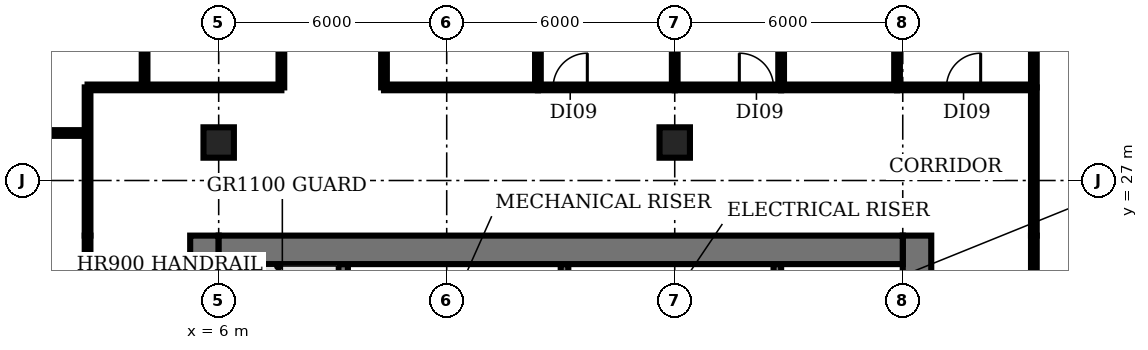
"""IFC4 building model, lengths in metres.
Left out: names, types, materials, properties, quantities, classifications, styles, units other than length and angle.
Written with IfcOpenShell. Run it as: python <this file> out.ifc"""

import sys

from ifc_helpers import new_model, si_unit, direction, frame, frame_2d, origin, origin_2d, place, context, subcontext, project, spatial, rectangle, extrude, element, fill, save


model = new_model("IFC4")
c1 = context("Model", 3, precision=1e-05, world=origin(), true_north=direction((0.0, 1.0)))
c2 = subcontext(c1, "Body", "Model", "MODEL_VIEW")
j1 = project(units=[si_unit("LENGTHUNIT", "METRE"), si_unit("PLANEANGLEUNIT", "RADIAN")], contexts=[c1])
p1 = place(None, origin())
s1 = spatial("IfcSite", under=j1, at=p1, CompositionType="ELEMENT")
p2 = place(p1, origin())
s2 = spatial("IfcBuilding", under=s1, at=p2, CompositionType="ELEMENT")
p3 = place(p2, frame((0.0, 0.0, 92.0)))
s3 = spatial("IfcBuildingStorey", under=s2, at=p3, CompositionType="ELEMENT", Elevation=92.0)
for number, where, z_axis, x_axis in (
    (1, (6.0, 28.0, 0.0), (0.0, 0.0, 1.0), (1.0, 0.0, 0.0)),
    (2, (18.0, 28.0, 0.0), (0.0, 0.0, 1.0), (1.0, 0.0, 0.0)),
):
    element("IfcColumn", number, at=place(p3, frame(where, z_axis=z_axis, x_axis=x_axis)), inside=s3, PredefinedType="COLUMN", context=c2, shape_type="SweptSolid", body=[
        extrude(rectangle(XDim=0.8, YDim=0.8, at=origin_2d()), origin(), (0.0, 0.0, 1.0), 3.85),
    ])
p4 = place(p3, frame((9.275, 18.375, 0.0), z_axis=(0.0, 0.0, 1.0), x_axis=(0.0, 1.0, 0.0)))
e3 = element("IfcWall", 3, at=p4, inside=s3, PredefinedType="SHEAR", context=c2, shape_type="SweptSolid", body=[
    extrude(rectangle(XDim=6.425, YDim=0.25, at=frame_2d((3.212, 0.0))), origin(), (0.0, 0.0, 1.0), 3.85),
])
for number, where, z_axis, x_axis in (
    (4, (15.1, 22.9, 0.0), (0.0, 0.0, 1.0), (0.0, 1.0, 0.0)),
    (5, (20.7, 22.9, 0.0), (0.0, 0.0, 1.0), (0.0, 1.0, 0.0)),
):
    element("IfcWall", number, at=place(p3, frame(where, z_axis=z_axis, x_axis=x_axis)), inside=s3, PredefinedType="SHEAR", context=c2, shape_type="SweptSolid", body=[
        extrude(rectangle(XDim=1.9, YDim=0.2, at=frame_2d((0.95, 0.0))), origin(), (0.0, 0.0, 1.0), 3.85),
    ])
p5 = place(p3, frame((5.625, 4.47, 0.0), z_axis=(0.0, 0.0, 1.0), x_axis=(0.0, 1.0, 0.0)))
e6 = element("IfcWall", 6, at=p5, inside=s3, PredefinedType="SHEAR", context=c2, shape_type="SweptSolid", body=[
    extrude(rectangle(XDim=21.08, YDim=0.75, at=frame_2d((10.54, 0.0))), origin(), (0.0, 0.0, 1.0), 3.85),
])
p6 = place(p5, frame((1.18, 0.0, 0.0)))
e7 = element("IfcOpeningElement", 7, at=p6, cuts=e6, PredefinedType="OPENING", context=c2, shape_type="SweptSolid", body=[
    extrude(rectangle(XDim=1.5, YDim=2.1, at=frame_2d((0.75, 1.05))), frame((0.0, 0.385, 0.0), z_axis=(0.0, -1.0, 0.0), x_axis=(1.0, 0.0, 0.0)), (0.0, 0.0, 1.0), 0.77),
])
p7 = place(p5, frame((7.63, 0.0, 0.0)))
e8 = element("IfcOpeningElement", 8, at=p7, cuts=e6, PredefinedType="OPENING", context=c2, shape_type="SweptSolid", body=[
    extrude(rectangle(XDim=1.2, YDim=2.1, at=frame_2d((0.6, 1.05))), frame((0.0, 0.385, 0.0), z_axis=(0.0, -1.0, 0.0), x_axis=(1.0, 0.0, 0.0)), (0.0, 0.0, 1.0), 0.77),
])
p8 = place(p5, frame((14.18, 0.0, 0.0)))
e9 = element("IfcOpeningElement", 9, at=p8, cuts=e6, PredefinedType="OPENING", context=c2, shape_type="SweptSolid", body=[
    extrude(rectangle(XDim=1.2, YDim=2.1, at=frame_2d((0.6, 1.05))), frame((0.0, 0.385, 0.0), z_axis=(0.0, -1.0, 0.0), x_axis=(1.0, 0.0, 0.0)), (0.0, 0.0, 1.0), 0.77),
])
p9 = place(p3, frame((24.375, 25.55, 0.0), z_axis=(0.0, 0.0, 1.0), x_axis=(0.0, -1.0, 0.0)))
e10 = element("IfcWall", 10, at=p9, inside=s3, PredefinedType="SHEAR", context=c2, shape_type="SweptSolid", body=[
    extrude(rectangle(XDim=21.13, YDim=0.75, at=frame_2d((10.565, 0.0))), origin(), (0.0, 0.0, 1.0), 3.85),
])
p10 = place(p9, frame((18.4, 0.0, 0.0)))
e11 = element("IfcOpeningElement", 11, at=p10, cuts=e10, PredefinedType="OPENING", context=c2, shape_type="SweptSolid", body=[
    extrude(rectangle(XDim=1.5, YDim=2.1, at=frame_2d((0.75, 1.05))), frame((0.0, 0.385, 0.0), z_axis=(0.0, -1.0, 0.0), x_axis=(1.0, 0.0, 0.0)), (0.0, 0.0, 1.0), 0.77),
])
p11 = place(p9, frame((12.3, 0.0, 0.0)))
e12 = element("IfcOpeningElement", 12, at=p11, cuts=e10, PredefinedType="OPENING", context=c2, shape_type="SweptSolid", body=[
    extrude(rectangle(XDim=0.9, YDim=2.1, at=frame_2d((0.45, 1.05))), frame((0.0, 0.385, 0.0), z_axis=(0.0, -1.0, 0.0), x_axis=(1.0, 0.0, 0.0)), (0.0, 0.0, 1.0), 0.77),
])
p12 = place(p9, frame((6.3, 0.0, 0.0)))
e13 = element("IfcOpeningElement", 13, at=p12, cuts=e10, PredefinedType="OPENING", context=c2, shape_type="SweptSolid", body=[
    extrude(rectangle(XDim=2.0, YDim=2.1, at=frame_2d((1.0, 1.05))), frame((0.0, 0.385, 0.0), z_axis=(0.0, -1.0, 0.0), x_axis=(1.0, 0.0, 0.0)), (0.0, 0.0, 1.0), 0.77),
])
p13 = place(p3, frame((6.0, 25.175, 0.0), z_axis=(0.0, 0.0, 1.0), x_axis=(1.0, 0.0, 0.0)))
e14 = element("IfcWall", 14, at=p13, inside=s3, PredefinedType="SHEAR", context=c2, shape_type="SweptSolid", body=[
    extrude(rectangle(XDim=18.0, YDim=0.75, at=frame_2d((9.0, 0.0))), origin(), (0.0, 0.0, 1.0), 3.85),
])
p14 = place(p3, frame((-0.98, 28.25, 0.0), z_axis=(0.0, 0.0, 1.0), x_axis=(1.0, 0.0, 0.0)))
e15 = element("IfcWall", 15, at=p14, inside=s3, PredefinedType="PARTITIONING", context=c2, shape_type="SweptSolid", body=[
    extrude(rectangle(XDim=3.53, YDim=0.15, at=frame_2d((1.765, 0.0))), origin(), (0.0, 0.0, 1.0), 2.83),
])
p15 = place(p3, frame((2.55, 6.078, 0.0), z_axis=(0.0, 0.0, 1.0), x_axis=(0.0, 1.0, 0.0)))
e16 = element("IfcWall", 16, at=p15, inside=s3, PredefinedType="PARTITIONING", context=c2, shape_type="SweptSolid", body=[
    extrude(rectangle(XDim=19.472, YDim=0.15, at=frame_2d((9.736, 0.0))), origin(), (0.0, 0.0, 1.0), 2.83),
])
p16 = place(p15, frame((7.572, 0.0, 0.0)))
e17 = element("IfcOpeningElement", 17, at=p16, cuts=e16, PredefinedType="OPENING", context=c2, shape_type="SweptSolid", body=[
    extrude(rectangle(XDim=1.2, YDim=2.1, at=frame_2d((0.6, 1.05))), frame((0.0, 0.085, 0.0), z_axis=(0.0, -1.0, 0.0), x_axis=(1.0, 0.0, 0.0)), (0.0, 0.0, 1.0), 0.17),
])
p17 = place(p3, frame((2.55, 25.55, 0.0), z_axis=(0.0, 0.0, 1.0), x_axis=(0.0, 1.0, 0.0)))
e18 = element("IfcWall", 18, at=p17, inside=s3, PredefinedType="PARTITIONING", context=c2, shape_type="SweptSolid", body=[
    extrude(rectangle(XDim=3.9, YDim=0.15, at=frame_2d((1.95, 0.0))), origin(), (0.0, 0.0, 1.0), 2.83),
])
p18 = place(p3, frame((2.55, 29.45, 0.0), z_axis=(0.0, 0.0, 1.0), x_axis=(1.0, 0.0, 0.0)))
e19 = element("IfcWall", 19, at=p18, inside=s3, PredefinedType="PARTITIONING", context=c2, shape_type="SweptSolid", body=[
    extrude(rectangle(XDim=5.1, YDim=0.15, at=frame_2d((2.55, 0.0))), origin(), (0.0, 0.0, 1.0), 2.83),
])
p19 = place(p3, frame((4.05, 29.45, 0.0), z_axis=(0.0, 0.0, 1.0), x_axis=(0.0, 1.0, 0.0)))
e20 = element("IfcWall", 20, at=p19, inside=s3, PredefinedType="PARTITIONING", context=c2, shape_type="SweptSolid", body=[
    extrude(rectangle(XDim=4.8, YDim=0.15, at=frame_2d((2.4, 0.0))), origin(), (0.0, 0.0, 1.0), 2.83),
])
p20 = place(p3, frame((7.65, 29.45, 0.0), z_axis=(0.0, 0.0, 1.0), x_axis=(0.0, 1.0, 0.0)))
e21 = element("IfcWall", 21, at=p20, inside=s3, PredefinedType="PARTITIONING", context=c2, shape_type="SweptSolid", body=[
    extrude(rectangle(XDim=4.8, YDim=0.15, at=frame_2d((2.4, 0.0))), origin(), (0.0, 0.0, 1.0), 2.83),
])
p21 = place(p20, frame((1.9, 0.0, 0.0)))
e22 = element("IfcOpeningElement", 22, at=p21, cuts=e21, PredefinedType="OPENING", context=c2, shape_type="SweptSolid", body=[
    extrude(rectangle(XDim=0.9, YDim=2.1, at=frame_2d((0.45, 1.05))), frame((0.0, 0.085, 0.0), z_axis=(0.0, -1.0, 0.0), x_axis=(1.0, 0.0, 0.0)), (0.0, 0.0, 1.0), 0.17),
])
p22 = place(p3, frame((10.35, 29.45, 0.0), z_axis=(0.0, 0.0, 1.0), x_axis=(0.0, 1.0, 0.0)))
e23 = element("IfcWall", 23, at=p22, inside=s3, PredefinedType="PARTITIONING", context=c2, shape_type="SweptSolid", body=[
    extrude(rectangle(XDim=4.8, YDim=0.15, at=frame_2d((2.4, 0.0))), origin(), (0.0, 0.0, 1.0), 2.83),
])
p23 = place(p3, frame((10.35, 29.45, 0.0), z_axis=(0.0, 0.0, 1.0), x_axis=(1.0, 0.0, 0.0)))
e24 = element("IfcWall", 24, at=p23, inside=s3, PredefinedType="PARTITIONING", context=c2, shape_type="SweptSolid", body=[
    extrude(rectangle(XDim=4.05, YDim=0.15, at=frame_2d((2.025, 0.0))), origin(), (0.0, 0.0, 1.0), 2.83),
])
p24 = place(p3, frame((14.4, 29.45, 0.0), z_axis=(0.0, 0.0, 1.0), x_axis=(0.0, 1.0, 0.0)))
e25 = element("IfcWall", 25, at=p24, inside=s3, PredefinedType="PARTITIONING", context=c2, shape_type="SweptSolid", body=[
    extrude(rectangle(XDim=4.8, YDim=0.15, at=frame_2d((2.4, 0.0))), origin(), (0.0, 0.0, 1.0), 2.83),
])
p25 = place(p3, frame((14.4, 29.45, 0.0), z_axis=(0.0, 0.0, 1.0), x_axis=(1.0, 0.0, 0.0)))
e26 = element("IfcWall", 26, at=p25, inside=s3, PredefinedType="PARTITIONING", context=c2, shape_type="SweptSolid", body=[
    extrude(rectangle(XDim=3.6, YDim=0.15, at=frame_2d((1.8, 0.0))), origin(), (0.0, 0.0, 1.0), 2.83),
])
p26 = place(p25, frame((0.4, 0.0, 0.0)))
e27 = element("IfcOpeningElement", 27, at=p26, cuts=e26, PredefinedType="OPENING", context=c2, shape_type="SweptSolid", body=[
    extrude(rectangle(XDim=0.9, YDim=2.1, at=frame_2d((0.45, 1.05))), frame((0.0, 0.085, 0.0), z_axis=(0.0, -1.0, 0.0), x_axis=(1.0, 0.0, 0.0)), (0.0, 0.0, 1.0), 0.17),
])
p27 = place(p3, frame((18.0, 29.45, 0.0), z_axis=(0.0, 0.0, 1.0), x_axis=(0.0, 1.0, 0.0)))
e28 = element("IfcWall", 28, at=p27, inside=s3, PredefinedType="PARTITIONING", context=c2, shape_type="SweptSolid", body=[
    extrude(rectangle(XDim=4.8, YDim=0.15, at=frame_2d((2.4, 0.0))), origin(), (0.0, 0.0, 1.0), 2.83),
])
p28 = place(p3, frame((18.0, 29.45, 0.0), z_axis=(0.0, 0.0, 1.0), x_axis=(1.0, 0.0, 0.0)))
e29 = element("IfcWall", 29, at=p28, inside=s3, PredefinedType="PARTITIONING", context=c2, shape_type="SweptSolid", body=[
    extrude(rectangle(XDim=2.8, YDim=0.15, at=frame_2d((1.4, 0.0))), origin(), (0.0, 0.0, 1.0), 2.83),
])
p29 = place(p28, frame((1.7, 0.0, 0.0)))
e30 = element("IfcOpeningElement", 30, at=p29, cuts=e29, PredefinedType="OPENING", context=c2, shape_type="SweptSolid", body=[
    extrude(rectangle(XDim=0.9, YDim=2.1, at=frame_2d((0.45, 1.05))), frame((0.0, 0.085, 0.0), z_axis=(0.0, -1.0, 0.0), x_axis=(1.0, 0.0, 0.0)), (0.0, 0.0, 1.0), 0.17),
])
p30 = place(p3, frame((20.8, 29.45, 0.0), z_axis=(0.0, 0.0, 1.0), x_axis=(0.0, 1.0, 0.0)))
e31 = element("IfcWall", 31, at=p30, inside=s3, PredefinedType="PARTITIONING", context=c2, shape_type="SweptSolid", body=[
    extrude(rectangle(XDim=4.8, YDim=0.15, at=frame_2d((2.4, 0.0))), origin(), (0.0, 0.0, 1.0), 2.83),
])
p31 = place(p3, frame((20.8, 29.45, 0.0), z_axis=(0.0, 0.0, 1.0), x_axis=(1.0, 0.0, 0.0)))
e32 = element("IfcWall", 32, at=p31, inside=s3, PredefinedType="PARTITIONING", context=c2, shape_type="SweptSolid", body=[
    extrude(rectangle(XDim=3.05, YDim=0.15, at=frame_2d((1.525, 0.0))), origin(), (0.0, 0.0, 1.0), 2.83),
])
p32 = place(p3, frame((23.85, 29.45, 0.0), z_axis=(0.0, 0.0, 1.0), x_axis=(0.0, 1.0, 0.0)))
e33 = element("IfcWall", 33, at=p32, inside=s3, PredefinedType="PARTITIONING", context=c2, shape_type="SweptSolid", body=[
    extrude(rectangle(XDim=4.8, YDim=0.15, at=frame_2d((2.4, 0.0))), origin(), (0.0, 0.0, 1.0), 2.83),
])
p33 = place(p3, frame((23.85, 29.45, 0.0), z_axis=(0.0, 0.0, 1.0), x_axis=(1.0, 0.0, 0.0)))
e34 = element("IfcWall", 34, at=p33, inside=s3, PredefinedType="PARTITIONING", context=c2, shape_type="SweptSolid", body=[
    extrude(rectangle(XDim=3.6, YDim=0.15, at=frame_2d((1.8, 0.0))), origin(), (0.0, 0.0, 1.0), 2.83),
])
p34 = place(p33, frame((1.3, 0.0, 0.0)))
e35 = element("IfcOpeningElement", 35, at=p34, cuts=e34, PredefinedType="OPENING", context=c2, shape_type="SweptSolid", body=[
    extrude(rectangle(XDim=0.9, YDim=2.1, at=frame_2d((0.45, 1.05))), frame((0.0, 0.085, 0.0), z_axis=(0.0, -1.0, 0.0), x_axis=(1.0, 0.0, 0.0)), (0.0, 0.0, 1.0), 0.17),
])
p35 = place(p3, frame((27.45, 25.55, 0.0), z_axis=(0.0, 0.0, 1.0), x_axis=(0.0, -1.0, 0.0)))
e36 = element("IfcWall", 36, at=p35, inside=s3, PredefinedType="PARTITIONING", context=c2, shape_type="SweptSolid", body=[
    extrude(rectangle(XDim=16.45, YDim=0.15, at=frame_2d((8.225, 0.0))), origin(), (0.0, 0.0, 1.0), 2.83),
])
p36 = place(p35, frame((7.55, 0.0, 0.0)))
e37 = element("IfcOpeningElement", 37, at=p36, cuts=e36, PredefinedType="OPENING", context=c2, shape_type="SweptSolid", body=[
    extrude(rectangle(XDim=1.2, YDim=2.1, at=frame_2d((0.6, 1.05))), frame((0.0, 0.085, 0.0), z_axis=(0.0, -1.0, 0.0), x_axis=(1.0, 0.0, 0.0)), (0.0, 0.0, 1.0), 0.17),
])
p37 = place(p3, frame((27.45, 25.55, 0.0), z_axis=(0.0, 0.0, 1.0), x_axis=(0.0, 1.0, 0.0)))
e38 = element("IfcWall", 38, at=p37, inside=s3, PredefinedType="PARTITIONING", context=c2, shape_type="SweptSolid", body=[
    extrude(rectangle(XDim=3.9, YDim=0.15, at=frame_2d((1.95, 0.0))), origin(), (0.0, 0.0, 1.0), 2.83),
])
p38 = place(p3, frame((27.45, 29.45, 0.0), z_axis=(0.0, 0.0, 1.0), x_axis=(0.0, 1.0, 0.0)))
e39 = element("IfcWall", 39, at=p38, inside=s3, PredefinedType="PARTITIONING", context=c2, shape_type="SweptSolid", body=[
    extrude(rectangle(XDim=2.93, YDim=0.15, at=frame_2d((1.465, 0.0))), origin(), (0.0, 0.0, 1.0), 2.83),
])
p39 = place(p26, origin())
e40 = element("IfcDoor", 40, at=p39, inside=s3, OperationType="SINGLE_SWING_RIGHT", PredefinedType="DOOR", context=c2, shape_type="SweptSolid", body=[
    extrude(rectangle(XDim=0.9, YDim=2.1, at=frame_2d((0.45, 1.05))), frame((0.0, 0.025, 0.0), z_axis=(0.0, -1.0, 0.0), x_axis=(1.0, 0.0, 0.0)), (0.0, 0.0, 1.0), 0.05),
])
fill(e27, e40)
p40 = place(p29, origin())
e41 = element("IfcDoor", 41, at=p40, inside=s3, OperationType="SINGLE_SWING_LEFT", PredefinedType="DOOR", context=c2, shape_type="SweptSolid", body=[
    extrude(rectangle(XDim=0.9, YDim=2.1, at=frame_2d((0.45, 1.05))), frame((0.0, 0.025, 0.0), z_axis=(0.0, -1.0, 0.0), x_axis=(1.0, 0.0, 0.0)), (0.0, 0.0, 1.0), 0.05),
])
fill(e30, e41)
p41 = place(p34, origin())
e42 = element("IfcDoor", 42, at=p41, inside=s3, OperationType="SINGLE_SWING_RIGHT", PredefinedType="DOOR", context=c2, shape_type="SweptSolid", body=[
    extrude(rectangle(XDim=0.9, YDim=2.1, at=frame_2d((0.45, 1.05))), frame((0.0, 0.025, 0.0), z_axis=(0.0, -1.0, 0.0), x_axis=(1.0, 0.0, 0.0)), (0.0, 0.0, 1.0), 0.05),
])
fill(e35, e42)
save(model, sys.argv[1])
